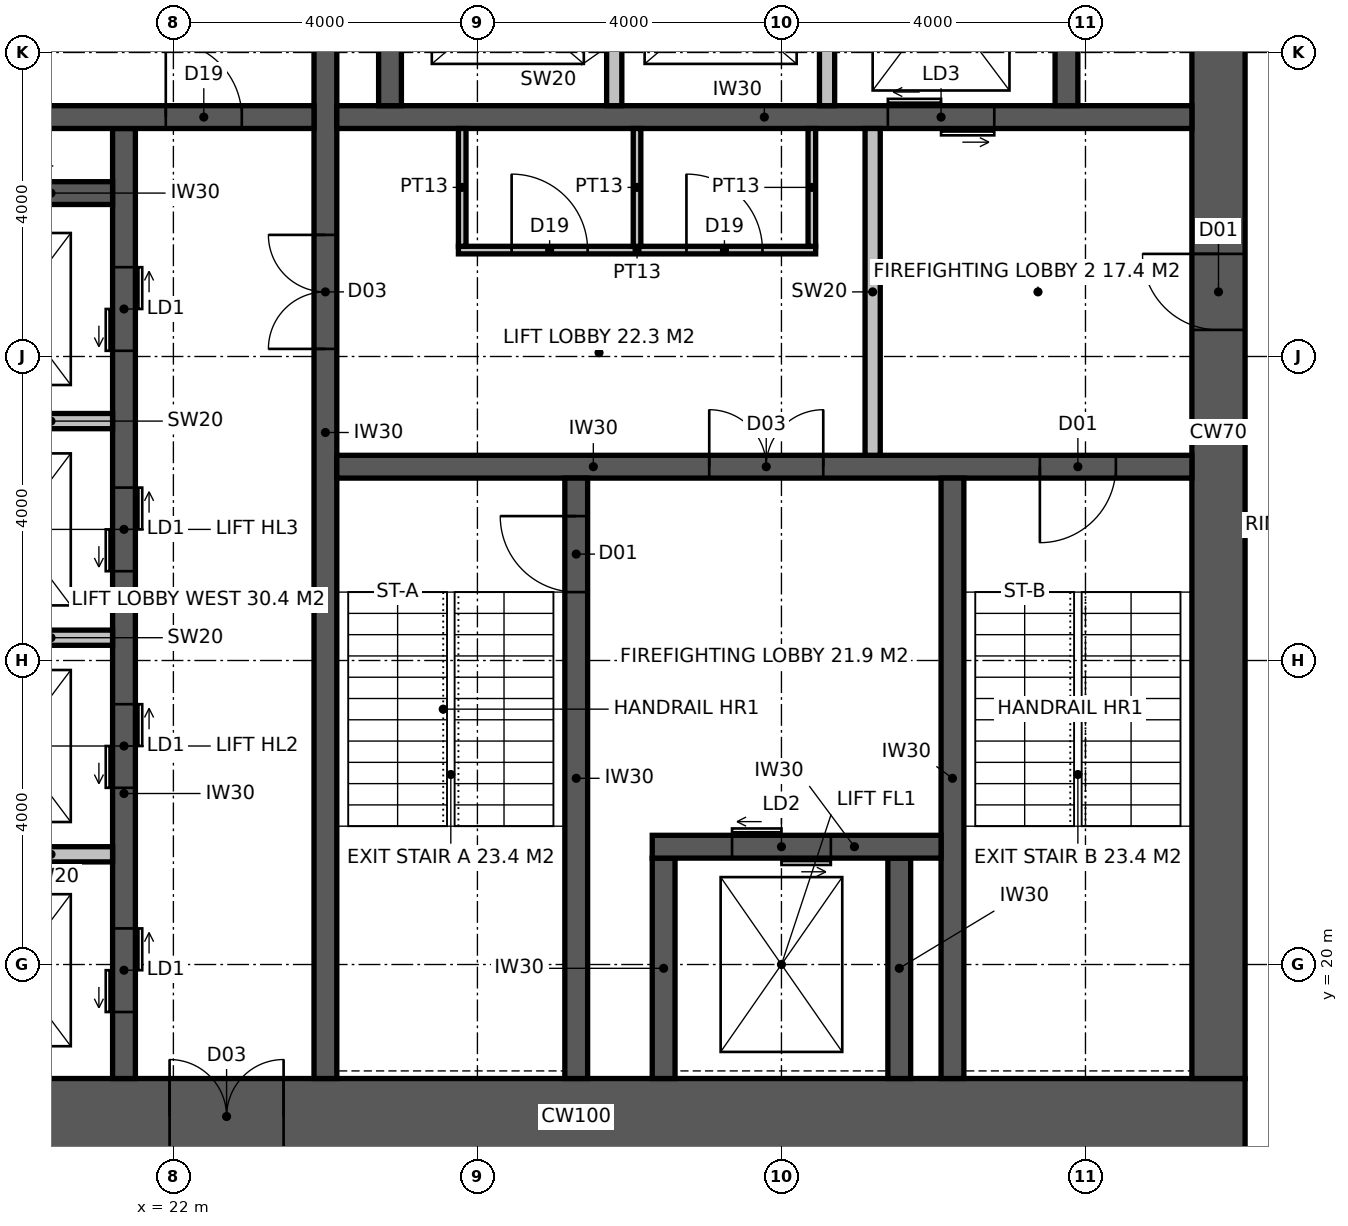
"""IFC4 building model, lengths in metres.
Left out: names, types, materials, properties, quantities, classifications, styles, units other than length and angle.
Written with IfcOpenShell. Run it as: python <this file> out.ifc"""

import sys

from ifc_helpers import new_model, si_unit, direction, frame, frame_2d, origin, place, context, subcontext, project, spatial, rectangle, extrude, element, fill, save


model = new_model("IFC4")
c1 = context("Model", 3, precision=1e-05, world=origin(), true_north=direction((0.0, 1.0)))
c2 = subcontext(c1, "Body", "Model", "MODEL_VIEW")
j1 = project(units=[si_unit("LENGTHUNIT", "METRE"), si_unit("PLANEANGLEUNIT", "RADIAN")], contexts=[c1])
p1 = place(None, origin())
s1 = spatial("IfcSite", under=j1, at=p1, CompositionType="ELEMENT")
p2 = place(p1, origin())
s2 = spatial("IfcBuilding", under=s1, at=p2, CompositionType="ELEMENT")
p3 = place(p2, frame((0.0, 0.0, 147.8)))
s3 = spatial("IfcBuildingStorey", under=s2, at=p3, CompositionType="ELEMENT", Elevation=147.8)
p4 = place(p3, frame((18.5, 18.0, -0.15), z_axis=(0.0, 0.0, 1.0), x_axis=(1.0, 0.0, 0.0)))
e1 = element("IfcWall", 1, at=p4, inside=s3, PredefinedType="SHEAR", context=c2, shape_type="SweptSolid", body=[
    extrude(rectangle(XDim=17.6, YDim=1.0, at=frame_2d((8.8, 0.0))), origin(), (0.0, 0.0, 1.0), 4.0),
])
p5 = place(p4, frame((3.45, 0.0, 0.15)))
e2 = element("IfcOpeningElement", 2, at=p5, cuts=e1, PredefinedType="OPENING", context=c2, shape_type="SweptSolid", body=[
    extrude(rectangle(XDim=1.5, YDim=2.4, at=frame_2d((0.75, 1.2))), frame((0.0, 0.51, 0.0), z_axis=(0.0, -1.0, 0.0), x_axis=(1.0, 0.0, 0.0)), (0.0, 0.0, 1.0), 1.02),
])
p6 = place(p3, frame((35.75, 18.5, -0.15), z_axis=(0.0, 0.0, 1.0), x_axis=(0.0, 1.0, 0.0)))
e3 = element("IfcWall", 3, at=p6, inside=s3, PredefinedType="SHEAR", context=c2, shape_type="SweptSolid", body=[
    extrude(rectangle(XDim=17.0, YDim=0.7, at=frame_2d((8.5, 0.0))), origin(), (0.0, 0.0, 1.0), 4.0),
])
p7 = place(p6, frame((9.85, 0.0, 0.15)))
e4 = element("IfcOpeningElement", 4, at=p7, cuts=e3, PredefinedType="OPENING", context=c2, shape_type="SweptSolid", body=[
    extrude(rectangle(XDim=1.0, YDim=2.2, at=frame_2d((0.5, 1.1))), frame((0.0, 0.36, 0.0), z_axis=(0.0, -1.0, 0.0), x_axis=(1.0, 0.0, 0.0)), (0.0, 0.0, 1.0), 0.72),
])
p8 = place(p3, frame((24.0, 18.5, -0.15), z_axis=(0.0, 0.0, 1.0), x_axis=(0.0, 1.0, 0.0)))
e5 = element("IfcWall", 5, at=p8, inside=s3, PredefinedType="SHEAR", context=c2, shape_type="SweptSolid", body=[
    extrude(rectangle(XDim=17.0, YDim=0.3, at=frame_2d((8.5, 0.0))), origin(), (0.0, 0.0, 1.0), 4.0),
])
p9 = place(p8, frame((9.6, 0.0, 0.15)))
e6 = element("IfcOpeningElement", 6, at=p9, cuts=e5, PredefinedType="OPENING", context=c2, shape_type="SweptSolid", body=[
    extrude(rectangle(XDim=1.5, YDim=2.4, at=frame_2d((0.75, 1.2))), frame((0.0, 0.16, 0.0), z_axis=(0.0, -1.0, 0.0), x_axis=(1.0, 0.0, 0.0)), (0.0, 0.0, 1.0), 0.32),
])
p10 = place(p3, frame((24.15, 26.55, -0.15), z_axis=(0.0, 0.0, 1.0), x_axis=(1.0, 0.0, 0.0)))
e7 = element("IfcWall", 7, at=p10, inside=s3, PredefinedType="SHEAR", context=c2, shape_type="SweptSolid", body=[
    extrude(rectangle(XDim=11.25, YDim=0.3, at=frame_2d((5.625, 0.0))), origin(), (0.0, 0.0, 1.0), 4.0),
])
p11 = place(p10, frame((9.25, 0.0, 0.15)))
e8 = element("IfcOpeningElement", 8, at=p11, cuts=e7, PredefinedType="OPENING", context=c2, shape_type="SweptSolid", body=[
    extrude(rectangle(XDim=1.0, YDim=2.2, at=frame_2d((0.5, 1.1))), frame((0.0, 0.16, 0.0), z_axis=(0.0, -1.0, 0.0), x_axis=(1.0, 0.0, 0.0)), (0.0, 0.0, 1.0), 0.32),
])
p12 = place(p10, frame((4.9, 0.0, 0.15)))
e9 = element("IfcOpeningElement", 9, at=p12, cuts=e7, PredefinedType="OPENING", context=c2, shape_type="SweptSolid", body=[
    extrude(rectangle(XDim=1.5, YDim=2.4, at=frame_2d((0.75, 1.2))), frame((0.0, 0.16, 0.0), z_axis=(0.0, -1.0, 0.0), x_axis=(1.0, 0.0, 0.0)), (0.0, 0.0, 1.0), 0.32),
])
p13 = place(p3, frame((27.3, 18.5, -0.15), z_axis=(0.0, 0.0, 1.0), x_axis=(0.0, 1.0, 0.0)))
e10 = element("IfcWall", 10, at=p13, inside=s3, PredefinedType="SHEAR", context=c2, shape_type="SweptSolid", body=[
    extrude(rectangle(XDim=7.9, YDim=0.3, at=frame_2d((3.95, 0.0))), origin(), (0.0, 0.0, 1.0), 4.0),
])
p14 = place(p13, frame((6.4, 0.0, 0.15)))
e11 = element("IfcOpeningElement", 11, at=p14, cuts=e10, PredefinedType="OPENING", context=c2, shape_type="SweptSolid", body=[
    extrude(rectangle(XDim=1.0, YDim=2.2, at=frame_2d((0.5, 1.1))), frame((0.0, 0.16, 0.0), z_axis=(0.0, -1.0, 0.0), x_axis=(1.0, 0.0, 0.0)), (0.0, 0.0, 1.0), 0.32),
])
p15 = place(p3, frame((32.25, 18.5, -0.15), z_axis=(0.0, 0.0, 1.0), x_axis=(0.0, 1.0, 0.0)))
e12 = element("IfcWall", 12, at=p15, inside=s3, PredefinedType="SHEAR", context=c2, shape_type="SweptSolid", body=[
    extrude(rectangle(XDim=7.9, YDim=0.3, at=frame_2d((3.95, 0.0))), origin(), (0.0, 0.0, 1.0), 4.0),
])
for number, where, z_axis, x_axis in (
    (13, (28.45, 18.5, -0.15), (0.0, 0.0, 1.0), (0.0, 1.0, 0.0)),
    (14, (31.55, 18.5, -0.15), (0.0, 0.0, 1.0), (0.0, 1.0, 0.0)),
):
    element("IfcWall", number, at=place(p3, frame(where, z_axis=z_axis, x_axis=x_axis)), inside=s3, PredefinedType="SHEAR", context=c2, shape_type="SweptSolid", body=[
        extrude(rectangle(XDim=2.9, YDim=0.3, at=frame_2d((1.45, 0.0))), origin(), (0.0, 0.0, 1.0), 4.0),
    ])
p16 = place(p3, frame((28.3, 21.55, -0.15), z_axis=(0.0, 0.0, 1.0), x_axis=(1.0, 0.0, 0.0)))
e15 = element("IfcWall", 15, at=p16, inside=s3, PredefinedType="SHEAR", context=c2, shape_type="SweptSolid", body=[
    extrude(rectangle(XDim=3.8, YDim=0.3, at=frame_2d((1.9, 0.0))), origin(), (0.0, 0.0, 1.0), 4.0),
])
p17 = place(p16, frame((1.05, 0.0, 0.15)))
e16 = element("IfcOpeningElement", 16, at=p17, cuts=e15, PredefinedType="OPENING", context=c2, shape_type="SweptSolid", body=[
    extrude(rectangle(XDim=1.3, YDim=2.4, at=frame_2d((0.65, 1.2))), frame((0.0, 0.16, 0.0), z_axis=(0.0, -1.0, 0.0), x_axis=(1.0, 0.0, 0.0)), (0.0, 0.0, 1.0), 0.32),
])
p18 = place(p3, frame((24.15, 31.15, -0.15), z_axis=(0.0, 0.0, 1.0), x_axis=(1.0, 0.0, 0.0)))
e17 = element("IfcWall", 17, at=p18, inside=s3, PredefinedType="SHEAR", context=c2, shape_type="SweptSolid", body=[
    extrude(rectangle(XDim=11.25, YDim=0.3, at=frame_2d((5.625, 0.0))), origin(), (0.0, 0.0, 1.0), 4.0),
])
p19 = place(p18, frame((7.25, 0.0, 0.15)))
e18 = element("IfcOpeningElement", 18, at=p19, cuts=e17, PredefinedType="OPENING", context=c2, shape_type="SweptSolid", body=[
    extrude(rectangle(XDim=1.4, YDim=2.4, at=frame_2d((0.7, 1.2))), frame((0.0, 0.16, 0.0), z_axis=(0.0, -1.0, 0.0), x_axis=(1.0, 0.0, 0.0)), (0.0, 0.0, 1.0), 0.32),
])
p20 = place(p3, frame((21.35, 18.5, -0.15), z_axis=(0.0, 0.0, 1.0), x_axis=(0.0, 1.0, 0.0)))
e19 = element("IfcWall", 19, at=p20, inside=s3, PredefinedType="SHEAR", context=c2, shape_type="SweptSolid", body=[
    extrude(rectangle(XDim=12.5, YDim=0.3, at=frame_2d((6.25, 0.0))), origin(), (0.0, 0.0, 1.0), 4.0),
])
p21 = place(p20, frame((0.875, 0.0, 0.15)))
e20 = element("IfcOpeningElement", 20, at=p21, cuts=e19, PredefinedType="OPENING", context=c2, shape_type="SweptSolid", body=[
    extrude(rectangle(XDim=1.1, YDim=2.2, at=frame_2d((0.55, 1.1))), frame((0.0, 0.16, 0.0), z_axis=(0.0, -1.0, 0.0), x_axis=(1.0, 0.0, 0.0)), (0.0, 0.0, 1.0), 0.32),
])
p22 = place(p20, frame((3.825, 0.0, 0.15)))
e21 = element("IfcOpeningElement", 21, at=p22, cuts=e19, PredefinedType="OPENING", context=c2, shape_type="SweptSolid", body=[
    extrude(rectangle(XDim=1.1, YDim=2.2, at=frame_2d((0.55, 1.1))), frame((0.0, 0.16, 0.0), z_axis=(0.0, -1.0, 0.0), x_axis=(1.0, 0.0, 0.0)), (0.0, 0.0, 1.0), 0.32),
])
p23 = place(p20, frame((6.675, 0.0, 0.15)))
e22 = element("IfcOpeningElement", 22, at=p23, cuts=e19, PredefinedType="OPENING", context=c2, shape_type="SweptSolid", body=[
    extrude(rectangle(XDim=1.1, YDim=2.2, at=frame_2d((0.55, 1.1))), frame((0.0, 0.16, 0.0), z_axis=(0.0, -1.0, 0.0), x_axis=(1.0, 0.0, 0.0)), (0.0, 0.0, 1.0), 0.32),
])
p24 = place(p20, frame((9.575, 0.0, 0.15)))
e23 = element("IfcOpeningElement", 23, at=p24, cuts=e19, PredefinedType="OPENING", context=c2, shape_type="SweptSolid", body=[
    extrude(rectangle(XDim=1.1, YDim=2.2, at=frame_2d((0.55, 1.1))), frame((0.0, 0.16, 0.0), z_axis=(0.0, -1.0, 0.0), x_axis=(1.0, 0.0, 0.0)), (0.0, 0.0, 1.0), 0.32),
])
p25 = place(p3, frame((18.5, 31.15, -0.15), z_axis=(0.0, 0.0, 1.0), x_axis=(1.0, 0.0, 0.0)))
e24 = element("IfcWall", 24, at=p25, inside=s3, PredefinedType="SHEAR", context=c2, shape_type="SweptSolid", body=[
    extrude(rectangle(XDim=5.35, YDim=0.3, at=frame_2d((2.675, 0.0))), origin(), (0.0, 0.0, 1.0), 4.0),
])
p26 = place(p25, frame((3.4, 0.0, 0.15)))
e25 = element("IfcOpeningElement", 25, at=p26, cuts=e24, PredefinedType="OPENING", context=c2, shape_type="SweptSolid", body=[
    extrude(rectangle(XDim=1.0, YDim=2.2, at=frame_2d((0.5, 1.1))), frame((0.0, 0.16, 0.0), z_axis=(0.0, -1.0, 0.0), x_axis=(1.0, 0.0, 0.0)), (0.0, 0.0, 1.0), 0.32),
])
p27 = place(p3, frame((18.5, 30.15, -0.15), z_axis=(0.0, 0.0, 1.0), x_axis=(1.0, 0.0, 0.0)))
e26 = element("IfcWall", 26, at=p27, inside=s3, PredefinedType="SHEAR", context=c2, shape_type="SweptSolid", body=[
    extrude(rectangle(XDim=2.7, YDim=0.3, at=frame_2d((1.35, 0.0))), origin(), (0.0, 0.0, 1.0), 4.0),
])
for number, where, z_axis, x_axis in (
    (27, (24.85, 31.3, -0.15), (0.0, 0.0, 1.0), (0.0, 1.0, 0.0)),
    (28, (33.75, 31.3, -0.15), (0.0, 0.0, 1.0), (0.0, 1.0, 0.0)),
):
    element("IfcWall", number, at=place(p3, frame(where, z_axis=z_axis, x_axis=x_axis)), inside=s3, PredefinedType="SHEAR", context=c2, shape_type="SweptSolid", body=[
        extrude(rectangle(XDim=4.2, YDim=0.3, at=frame_2d((2.1, 0.0))), origin(), (0.0, 0.0, 1.0), 4.0),
    ])
for number, where, z_axis, x_axis in (
    (29, (27.8, 31.3, -0.15), (0.0, 0.0, 1.0), (0.0, 1.0, 0.0)),
    (30, (30.6, 31.3, -0.15), (0.0, 0.0, 1.0), (0.0, 1.0, 0.0)),
):
    element("IfcWall", number, at=place(p3, frame(where, z_axis=z_axis, x_axis=x_axis)), inside=s3, PredefinedType="SOLIDWALL", context=c2, shape_type="SweptSolid", body=[
        extrude(rectangle(XDim=2.8, YDim=0.2, at=frame_2d((1.4, 0.0))), origin(), (0.0, 0.0, 1.0), 4.0),
    ])
for number, where, z_axis, x_axis in (
    (31, (18.5, 21.45, -0.15), (0.0, 0.0, 1.0), (1.0, 0.0, 0.0)),
    (32, (18.5, 24.3, -0.15), (0.0, 0.0, 1.0), (1.0, 0.0, 0.0)),
    (33, (18.5, 27.15, -0.15), (0.0, 0.0, 1.0), (1.0, 0.0, 0.0)),
):
    element("IfcWall", number, at=place(p3, frame(where, z_axis=z_axis, x_axis=x_axis)), inside=s3, PredefinedType="SOLIDWALL", context=c2, shape_type="SweptSolid", body=[
        extrude(rectangle(XDim=2.7, YDim=0.2, at=frame_2d((1.35, 0.0))), origin(), (0.0, 0.0, 1.0), 4.0),
    ])
p28 = place(p3, frame((31.2, 26.7, 0.0), z_axis=(0.0, 0.0, 1.0), x_axis=(0.0, 1.0, 0.0)))
e34 = element("IfcWall", 34, at=p28, inside=s3, PredefinedType="SOLIDWALL", context=c2, shape_type="SweptSolid", body=[
    extrude(rectangle(XDim=4.3, YDim=0.2, at=frame_2d((2.15, 0.0))), origin(), (0.0, 0.0, 1.0), 3.85),
])
p29 = place(p3, frame((25.75, 29.4, 0.0), z_axis=(0.0, 0.0, 1.0), x_axis=(1.0, 0.0, 0.0)))
e35 = element("IfcWall", 35, at=p29, inside=s3, PredefinedType="PARTITIONING", context=c2, shape_type="SweptSolid", body=[
    extrude(rectangle(XDim=4.7, YDim=0.1, at=frame_2d((2.35, 0.0))), origin(), (0.0, 0.0, 1.0), 3.85),
])
p30 = place(p29, frame((0.7, 0.0, 0.0)))
e36 = element("IfcOpeningElement", 36, at=p30, cuts=e35, PredefinedType="OPENING", context=c2, shape_type="SweptSolid", body=[
    extrude(rectangle(XDim=1.0, YDim=2.2, at=frame_2d((0.5, 1.1))), frame((0.0, 0.06, 0.0), z_axis=(0.0, -1.0, 0.0), x_axis=(1.0, 0.0, 0.0)), (0.0, 0.0, 1.0), 0.12),
])
p31 = place(p29, frame((3.0, 0.0, 0.0)))
e37 = element("IfcOpeningElement", 37, at=p31, cuts=e35, PredefinedType="OPENING", context=c2, shape_type="SweptSolid", body=[
    extrude(rectangle(XDim=1.0, YDim=2.2, at=frame_2d((0.5, 1.1))), frame((0.0, 0.06, 0.0), z_axis=(0.0, -1.0, 0.0), x_axis=(1.0, 0.0, 0.0)), (0.0, 0.0, 1.0), 0.12),
])
for number, where, z_axis, x_axis in (
    (38, (25.8, 29.45, 0.0), (0.0, 0.0, 1.0), (0.0, 1.0, 0.0)),
    (39, (30.4, 29.45, 0.0), (0.0, 0.0, 1.0), (0.0, 1.0, 0.0)),
    (40, (28.1, 29.45, 0.0), (0.0, 0.0, 1.0), (0.0, 1.0, 0.0)),
):
    element("IfcWall", number, at=place(p3, frame(where, z_axis=z_axis, x_axis=x_axis)), inside=s3, PredefinedType="PARTITIONING", context=c2, shape_type="SweptSolid", body=[
        extrude(rectangle(XDim=1.55, YDim=0.1, at=frame_2d((0.775, 0.0))), origin(), (0.0, 0.0, 1.0), 3.85),
    ])
p32 = place(p14, origin())
e41 = element("IfcDoor", 41, at=p32, inside=s3, OperationType="SINGLE_SWING_RIGHT", PredefinedType="DOOR", context=c2, shape_type="SweptSolid", body=[
    extrude(rectangle(XDim=1.0, YDim=2.2, at=frame_2d((0.5, 1.1))), frame((0.0, 0.025, 0.0), z_axis=(0.0, -1.0, 0.0), x_axis=(1.0, 0.0, 0.0)), (0.0, 0.0, 1.0), 0.05),
])
fill(e11, e41)
p33 = place(p11, frame((1.0, 0.0, 0.0), z_axis=(0.0, 0.0, 1.0), x_axis=(-1.0, 0.0, 0.0)))
e42 = element("IfcDoor", 42, at=p33, inside=s3, OperationType="SINGLE_SWING_RIGHT", PredefinedType="DOOR", context=c2, shape_type="SweptSolid", body=[
    extrude(rectangle(XDim=1.0, YDim=2.2, at=frame_2d((0.5, 1.1))), frame((0.0, 0.025, 0.0), z_axis=(0.0, -1.0, 0.0), x_axis=(1.0, 0.0, 0.0)), (0.0, 0.0, 1.0), 0.05),
])
fill(e8, e42)
p34 = place(p7, origin())
e43 = element("IfcDoor", 43, at=p34, inside=s3, OperationType="SINGLE_SWING_RIGHT", PredefinedType="DOOR", context=c2, shape_type="SweptSolid", body=[
    extrude(rectangle(XDim=1.0, YDim=2.2, at=frame_2d((0.5, 1.1))), frame((0.0, 0.025, 0.0), z_axis=(0.0, -1.0, 0.0), x_axis=(1.0, 0.0, 0.0)), (0.0, 0.0, 1.0), 0.05),
])
fill(e4, e43)
p35 = place(p12, origin())
e44 = element("IfcDoor", 44, at=p35, inside=s3, OperationType="DOUBLE_DOOR_DOUBLE_SWING", PredefinedType="DOOR", context=c2, shape_type="SweptSolid", body=[
    extrude(rectangle(XDim=1.5, YDim=2.4, at=frame_2d((0.75, 1.2))), frame((0.0, 0.025, 0.0), z_axis=(0.0, -1.0, 0.0), x_axis=(1.0, 0.0, 0.0)), (0.0, 0.0, 1.0), 0.05),
])
fill(e9, e44)
p36 = place(p9, origin())
e45 = element("IfcDoor", 45, at=p36, inside=s3, OperationType="DOUBLE_DOOR_DOUBLE_SWING", PredefinedType="DOOR", context=c2, shape_type="SweptSolid", body=[
    extrude(rectangle(XDim=1.5, YDim=2.4, at=frame_2d((0.75, 1.2))), frame((0.0, 0.025, 0.0), z_axis=(0.0, -1.0, 0.0), x_axis=(1.0, 0.0, 0.0)), (0.0, 0.0, 1.0), 0.05),
])
fill(e6, e45)
p37 = place(p26, origin())
e46 = element("IfcDoor", 46, at=p37, inside=s3, OperationType="SINGLE_SWING_LEFT", PredefinedType="DOOR", context=c2, shape_type="SweptSolid", body=[
    extrude(rectangle(XDim=1.0, YDim=2.2, at=frame_2d((0.5, 1.1))), frame((0.0, 0.025, 0.0), z_axis=(0.0, -1.0, 0.0), x_axis=(1.0, 0.0, 0.0)), (0.0, 0.0, 1.0), 0.05),
])
fill(e25, e46)
p38 = place(p30, origin())
e47 = element("IfcDoor", 47, at=p38, inside=s3, OperationType="SINGLE_SWING_LEFT", PredefinedType="DOOR", context=c2, shape_type="SweptSolid", body=[
    extrude(rectangle(XDim=1.0, YDim=2.2, at=frame_2d((0.5, 1.1))), frame((0.0, 0.025, 0.0), z_axis=(0.0, -1.0, 0.0), x_axis=(1.0, 0.0, 0.0)), (0.0, 0.0, 1.0), 0.05),
])
fill(e36, e47)
p39 = place(p31, origin())
e48 = element("IfcDoor", 48, at=p39, inside=s3, OperationType="SINGLE_SWING_LEFT", PredefinedType="DOOR", context=c2, shape_type="SweptSolid", body=[
    extrude(rectangle(XDim=1.0, YDim=2.2, at=frame_2d((0.5, 1.1))), frame((0.0, 0.025, 0.0), z_axis=(0.0, -1.0, 0.0), x_axis=(1.0, 0.0, 0.0)), (0.0, 0.0, 1.0), 0.05),
])
fill(e37, e48)
p40 = place(p5, origin())
e49 = element("IfcDoor", 49, at=p40, inside=s3, OperationType="DOUBLE_DOOR_DOUBLE_SWING", PredefinedType="DOOR", context=c2, shape_type="SweptSolid", body=[
    extrude(rectangle(XDim=1.5, YDim=2.4, at=frame_2d((0.75, 1.2))), frame((0.0, 0.025, 0.0), z_axis=(0.0, -1.0, 0.0), x_axis=(1.0, 0.0, 0.0)), (0.0, 0.0, 1.0), 0.05),
])
fill(e2, e49)
p41 = place(p17, origin())
e50 = element("IfcDoor", 50, at=p41, inside=s3, OperationType="DOUBLE_DOOR_SLIDING", PredefinedType="DOOR", context=c2, shape_type="SweptSolid", body=[
    extrude(rectangle(XDim=1.3, YDim=2.4, at=frame_2d((0.65, 1.2))), frame((0.0, 0.025, 0.0), z_axis=(0.0, -1.0, 0.0), x_axis=(1.0, 0.0, 0.0)), (0.0, 0.0, 1.0), 0.05),
])
fill(e16, e50)
p42 = place(p19, origin())
e51 = element("IfcDoor", 51, at=p42, inside=s3, OperationType="DOUBLE_DOOR_SLIDING", PredefinedType="DOOR", context=c2, shape_type="SweptSolid", body=[
    extrude(rectangle(XDim=1.4, YDim=2.4, at=frame_2d((0.7, 1.2))), frame((0.0, 0.025, 0.0), z_axis=(0.0, -1.0, 0.0), x_axis=(1.0, 0.0, 0.0)), (0.0, 0.0, 1.0), 0.05),
])
fill(e18, e51)
p43 = place(p21, origin())
e52 = element("IfcDoor", 52, at=p43, inside=s3, OperationType="DOUBLE_DOOR_SLIDING", PredefinedType="DOOR", context=c2, shape_type="SweptSolid", body=[
    extrude(rectangle(XDim=1.1, YDim=2.2, at=frame_2d((0.55, 1.1))), frame((0.0, 0.025, 0.0), z_axis=(0.0, -1.0, 0.0), x_axis=(1.0, 0.0, 0.0)), (0.0, 0.0, 1.0), 0.05),
])
fill(e20, e52)
p44 = place(p22, origin())
e53 = element("IfcDoor", 53, at=p44, inside=s3, OperationType="DOUBLE_DOOR_SLIDING", PredefinedType="DOOR", context=c2, shape_type="SweptSolid", body=[
    extrude(rectangle(XDim=1.1, YDim=2.2, at=frame_2d((0.55, 1.1))), frame((0.0, 0.025, 0.0), z_axis=(0.0, -1.0, 0.0), x_axis=(1.0, 0.0, 0.0)), (0.0, 0.0, 1.0), 0.05),
])
fill(e21, e53)
p45 = place(p23, origin())
e54 = element("IfcDoor", 54, at=p45, inside=s3, OperationType="DOUBLE_DOOR_SLIDING", PredefinedType="DOOR", context=c2, shape_type="SweptSolid", body=[
    extrude(rectangle(XDim=1.1, YDim=2.2, at=frame_2d((0.55, 1.1))), frame((0.0, 0.025, 0.0), z_axis=(0.0, -1.0, 0.0), x_axis=(1.0, 0.0, 0.0)), (0.0, 0.0, 1.0), 0.05),
])
fill(e22, e54)
p46 = place(p24, origin())
e55 = element("IfcDoor", 55, at=p46, inside=s3, OperationType="DOUBLE_DOOR_SLIDING", PredefinedType="DOOR", context=c2, shape_type="SweptSolid", body=[
    extrude(rectangle(XDim=1.1, YDim=2.2, at=frame_2d((0.55, 1.1))), frame((0.0, 0.025, 0.0), z_axis=(0.0, -1.0, 0.0), x_axis=(1.0, 0.0, 0.0)), (0.0, 0.0, 1.0), 0.05),
])
fill(e23, e55)
save(model, sys.argv[1])
